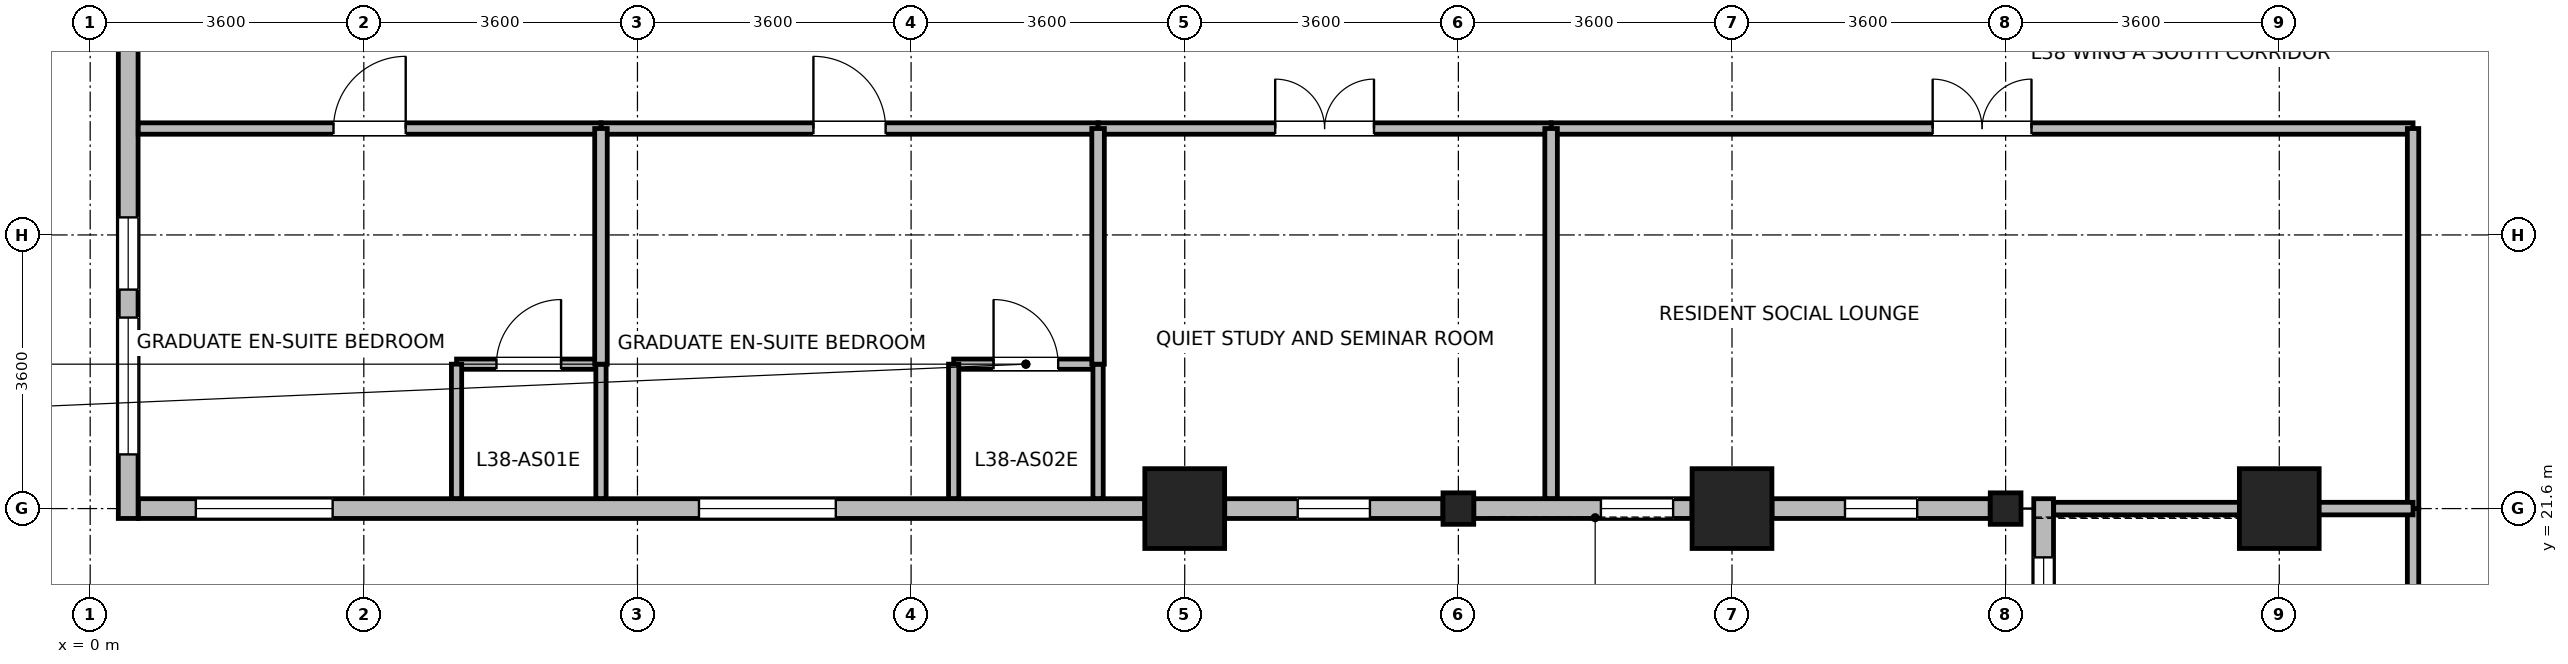
"""IFC4 building model, lengths in metres.
Left out: names, types, materials, properties, quantities, classifications, styles, units other than length and angle.
Written with IfcOpenShell. Run it as: python <this file> out.ifc"""

import sys

from ifc_helpers import new_model, si_unit, direction, frame, frame_2d, origin, origin_2d, place, context, subcontext, project, spatial, rectangle, i_section, extrude, source, transform, mapped, element, fill, save


model = new_model("IFC4")
c1 = context("Model", 3, precision=1e-05, world=origin(), true_north=direction((0.0, 1.0)))
c2 = subcontext(c1, "Body", "Model", "MODEL_VIEW")
j1 = project(units=[si_unit("LENGTHUNIT", "METRE"), si_unit("PLANEANGLEUNIT", "RADIAN")], contexts=[c1])
p1 = place(None, origin())
s1 = spatial("IfcSite", under=j1, at=p1, CompositionType="ELEMENT")
p2 = place(p1, origin())
s2 = spatial("IfcBuilding", under=s1, at=p2, CompositionType="ELEMENT")
p3 = place(p2, frame((0.0, 0.0, 151.3)))
s3 = spatial("IfcBuildingStorey", under=s2, at=p3, CompositionType="ELEMENT", Elevation=151.3)
m1 = source(origin(), c2, "Body", "SweptSolid", [
    extrude(rectangle(XDim=1.05, YDim=1.05, at=origin_2d()), origin(), (0.0, 0.0, 1.0), 3.7),
])
for number, where, z_axis, x_axis in (
    (1, (14.4, 21.6, 0.0), (0.0, 0.0, 1.0), (1.0, 0.0, 0.0)),
    (2, (21.6, 21.6, 0.0), (0.0, 0.0, 1.0), (1.0, 0.0, 0.0)),
    (3, (28.8, 21.6, 0.0), (0.0, 0.0, 1.0), (1.0, 0.0, 0.0)),
):
    element("IfcColumn", number, at=place(p3, frame(where, z_axis=z_axis, x_axis=x_axis)), inside=s3, PredefinedType="COLUMN", context=c2, shape_type="MappedRepresentation", body=[
        mapped(m1, transform((0.0, 0.0, 0.0), x_axis=(1.0, 0.0, 0.0), y_axis=(0.0, 1.0, 0.0), z_axis=(0.0, 0.0, 1.0), scale=1.0)),
    ])
m2 = source(origin(), c2, "Body", "SweptSolid", [
    extrude(i_section(OverallWidth=0.404, OverallDepth=0.414, WebThickness=0.021, FlangeThickness=0.028, FilletRadius=0.015, at=origin_2d()), origin(), (0.0, 0.0, 1.0), 3.7),
])
for number, where, z_axis, x_axis in (
    (4, (18.0, 21.6, 0.0), (0.0, 0.0, 1.0), (1.0, 0.0, 0.0)),
    (5, (25.2, 21.6, 0.0), (0.0, 0.0, 1.0), (1.0, 0.0, 0.0)),
):
    element("IfcColumn", number, at=place(p3, frame(where, z_axis=z_axis, x_axis=x_axis)), inside=s3, PredefinedType="COLUMN", context=c2, shape_type="MappedRepresentation", body=[
        mapped(m2, transform((0.0, 0.0, 0.0), x_axis=(1.0, 0.0, 0.0), y_axis=(0.0, 1.0, 0.0), z_axis=(0.0, 0.0, 1.0), scale=1.0)),
    ])
p4 = place(p3, frame((0.5, 21.47, 0.0), z_axis=(0.0, 0.0, 1.0), x_axis=(0.0, 1.0, 0.0)))
e6 = element("IfcWall", 6, at=p4, inside=s3, PredefinedType="STANDARD", context=c2, shape_type="SweptSolid", body=[
    extrude(rectangle(XDim=6.972, YDim=0.26, at=frame_2d((3.486, 0.0))), origin(), (0.0, 0.0, 1.0), 3.44),
])
p5 = place(p4, frame((0.843, 0.0, 0.85)))
e7 = element("IfcOpeningElement", 7, at=p5, cuts=e6, PredefinedType="OPENING", context=c2, shape_type="SweptSolid", body=[
    extrude(rectangle(XDim=1.8, YDim=1.85, at=frame_2d((0.9, 0.925))), frame((0.0, 0.14, 0.0), z_axis=(0.0, -1.0, 0.0), x_axis=(1.0, 0.0, 0.0)), (0.0, 0.0, 1.0), 0.28),
])
p6 = place(p4, frame((3.011, 0.0, 0.85)))
e8 = element("IfcOpeningElement", 8, at=p6, cuts=e6, PredefinedType="OPENING", context=c2, shape_type="SweptSolid", body=[
    extrude(rectangle(XDim=0.95, YDim=1.75, at=frame_2d((0.475, 0.875))), frame((0.0, 0.14, 0.0), z_axis=(0.0, -1.0, 0.0), x_axis=(1.0, 0.0, 0.0)), (0.0, 0.0, 1.0), 0.28),
])
p7 = place(p3, frame((13.874, 21.6, 0.0), z_axis=(0.0, 0.0, 1.0), x_axis=(-1.0, 0.0, 0.0)))
e9 = element("IfcWall", 9, at=p7, inside=s3, PredefinedType="STANDARD", context=c2, shape_type="SweptSolid", body=[
    extrude(rectangle(XDim=13.239, YDim=0.26, at=frame_2d((6.62, 0.0))), origin(), (0.0, 0.0, 1.0), 3.44),
])
p8 = place(p7, frame((4.065, 0.0, 0.85)))
e10 = element("IfcOpeningElement", 10, at=p8, cuts=e9, PredefinedType="OPENING", context=c2, shape_type="SweptSolid", body=[
    extrude(rectangle(XDim=1.8, YDim=1.85, at=frame_2d((0.9, 0.925))), frame((0.0, 0.14, 0.0), z_axis=(0.0, -1.0, 0.0), x_axis=(1.0, 0.0, 0.0)), (0.0, 0.0, 1.0), 0.28),
])
p9 = place(p7, frame((10.684, 0.0, 0.85)))
e11 = element("IfcOpeningElement", 11, at=p9, cuts=e9, PredefinedType="OPENING", context=c2, shape_type="SweptSolid", body=[
    extrude(rectangle(XDim=1.8, YDim=1.85, at=frame_2d((0.9, 0.925))), frame((0.0, 0.14, 0.0), z_axis=(0.0, -1.0, 0.0), x_axis=(1.0, 0.0, 0.0)), (0.0, 0.0, 1.0), 0.28),
])
p10 = place(p3, frame((17.797, 21.6, 0.0), z_axis=(0.0, 0.0, 1.0), x_axis=(-1.0, 0.0, 0.0)))
e12 = element("IfcWall", 12, at=p10, inside=s3, PredefinedType="STANDARD", context=c2, shape_type="SweptSolid", body=[
    extrude(rectangle(XDim=2.871, YDim=0.26, at=frame_2d((1.436, 0.0))), origin(), (0.0, 0.0, 1.0), 2.99),
])
p11 = place(p10, frame((0.96, 0.0, 0.85)))
e13 = element("IfcOpeningElement", 13, at=p11, cuts=e12, PredefinedType="OPENING", context=c2, shape_type="SweptSolid", body=[
    extrude(rectangle(XDim=0.95, YDim=1.75, at=frame_2d((0.475, 0.875))), frame((0.0, 0.14, 0.0), z_axis=(0.0, -1.0, 0.0), x_axis=(1.0, 0.0, 0.0)), (0.0, 0.0, 1.0), 0.28),
])
p12 = place(p3, frame((21.074, 21.6, 0.0), z_axis=(0.0, 0.0, 1.0), x_axis=(-1.0, 0.0, 0.0)))
e14 = element("IfcWall", 14, at=p12, inside=s3, PredefinedType="STANDARD", context=c2, shape_type="SweptSolid", body=[
    extrude(rectangle(XDim=2.871, YDim=0.26, at=frame_2d((1.436, 0.0))), origin(), (0.0, 0.0, 1.0), 2.99),
])
p13 = place(p12, frame((0.249, 0.0, 0.85)))
e15 = element("IfcOpeningElement", 15, at=p13, cuts=e14, PredefinedType="OPENING", context=c2, shape_type="SweptSolid", body=[
    extrude(rectangle(XDim=0.95, YDim=1.75, at=frame_2d((0.475, 0.875))), frame((0.0, 0.14, 0.0), z_axis=(0.0, -1.0, 0.0), x_axis=(1.0, 0.0, 0.0)), (0.0, 0.0, 1.0), 0.28),
])
p14 = place(p3, frame((24.997, 21.6, 0.0), z_axis=(0.0, 0.0, 1.0), x_axis=(-1.0, 0.0, 0.0)))
e16 = element("IfcWall", 16, at=p14, inside=s3, PredefinedType="STANDARD", context=c2, shape_type="SweptSolid", body=[
    extrude(rectangle(XDim=2.871, YDim=0.26, at=frame_2d((1.436, 0.0))), origin(), (0.0, 0.0, 1.0), 2.99),
])
p15 = place(p14, frame((0.96, 0.0, 0.85)))
e17 = element("IfcOpeningElement", 17, at=p15, cuts=e16, PredefinedType="OPENING", context=c2, shape_type="SweptSolid", body=[
    extrude(rectangle(XDim=0.95, YDim=1.75, at=frame_2d((0.475, 0.875))), frame((0.0, 0.14, 0.0), z_axis=(0.0, -1.0, 0.0), x_axis=(1.0, 0.0, 0.0)), (0.0, 0.0, 1.0), 0.28),
])
p16 = place(p3, frame((25.7, 1.67, 0.0), z_axis=(0.0, 0.0, 1.0), x_axis=(0.0, 1.0, 0.0)))
e18 = element("IfcWall", 18, at=p16, inside=s3, PredefinedType="STANDARD", context=c2, shape_type="SweptSolid", body=[
    extrude(rectangle(XDim=20.06, YDim=0.26, at=frame_2d((10.03, 0.0))), origin(), (0.0, 0.0, 1.0), 3.44),
])
p17 = place(p16, frame((0.772, 0.0, 0.85)))
e19 = element("IfcOpeningElement", 19, at=p17, cuts=e18, PredefinedType="OPENING", context=c2, shape_type="SweptSolid", body=[
    extrude(rectangle(XDim=1.8, YDim=1.85, at=frame_2d((0.9, 0.925))), frame((0.0, 0.14, 0.0), z_axis=(0.0, -1.0, 0.0), x_axis=(1.0, 0.0, 0.0)), (0.0, 0.0, 1.0), 0.28),
])
p18 = place(p16, frame((7.458, 0.0, 0.85)))
e20 = element("IfcOpeningElement", 20, at=p18, cuts=e18, PredefinedType="OPENING", context=c2, shape_type="SweptSolid", body=[
    extrude(rectangle(XDim=1.8, YDim=1.85, at=frame_2d((0.9, 0.925))), frame((0.0, 0.14, 0.0), z_axis=(0.0, -1.0, 0.0), x_axis=(1.0, 0.0, 0.0)), (0.0, 0.0, 1.0), 0.28),
])
p19 = place(p16, frame((14.145, 0.0, 0.85)))
e21 = element("IfcOpeningElement", 21, at=p19, cuts=e18, PredefinedType="OPENING", context=c2, shape_type="SweptSolid", body=[
    extrude(rectangle(XDim=1.8, YDim=1.85, at=frame_2d((0.9, 0.925))), frame((0.0, 0.14, 0.0), z_axis=(0.0, -1.0, 0.0), x_axis=(1.0, 0.0, 0.0)), (0.0, 0.0, 1.0), 0.28),
])
p20 = place(p16, frame((17.488, 0.0, 0.85)))
e22 = element("IfcOpeningElement", 22, at=p20, cuts=e18, PredefinedType="OPENING", context=c2, shape_type="SweptSolid", body=[
    extrude(rectangle(XDim=1.8, YDim=1.85, at=frame_2d((0.9, 0.925))), frame((0.0, 0.14, 0.0), z_axis=(0.0, -1.0, 0.0), x_axis=(1.0, 0.0, 0.0)), (0.0, 0.0, 1.0), 0.28),
])
p21 = place(p3, frame((11.36, 23.5, 0.0), z_axis=(0.0, 0.0, 1.0), x_axis=(1.0, 0.0, 0.0)))
e23 = element("IfcWall", 23, at=p21, inside=s3, PredefinedType="PARTITIONING", context=c2, shape_type="SweptSolid", body=[
    extrude(rectangle(XDim=1.9, YDim=0.135, at=frame_2d((0.95, 0.0))), origin(), (0.0, 0.0, 1.0), 3.44),
])
p22 = place(p21, frame((0.525, 0.0, 0.0)))
e24 = element("IfcOpeningElement", 24, at=p22, cuts=e23, PredefinedType="OPENING", context=c2, shape_type="SweptSolid", body=[
    extrude(rectangle(XDim=0.85, YDim=2.04, at=frame_2d((0.425, 1.02))), frame((0.0, 0.078, 0.0), z_axis=(0.0, -1.0, 0.0), x_axis=(1.0, 0.0, 0.0)), (0.0, 0.0, 1.0), 0.155),
])
p23 = place(p3, frame((4.82, 23.5, 0.0), z_axis=(0.0, 0.0, 1.0), x_axis=(1.0, 0.0, 0.0)))
e25 = element("IfcWall", 25, at=p23, inside=s3, PredefinedType="PARTITIONING", context=c2, shape_type="SweptSolid", body=[
    extrude(rectangle(XDim=1.9, YDim=0.135, at=frame_2d((0.95, 0.0))), origin(), (0.0, 0.0, 1.0), 3.44),
])
p24 = place(p23, frame((0.525, 0.0, 0.0)))
e26 = element("IfcOpeningElement", 26, at=p24, cuts=e25, PredefinedType="OPENING", context=c2, shape_type="SweptSolid", body=[
    extrude(rectangle(XDim=0.85, YDim=2.04, at=frame_2d((0.425, 1.02))), frame((0.0, 0.078, 0.0), z_axis=(0.0, -1.0, 0.0), x_axis=(1.0, 0.0, 0.0)), (0.0, 0.0, 1.0), 0.155),
])
for number, where, z_axis, x_axis in (
    (27, (4.82, 21.732, 0.0), (0.0, 0.0, 1.0), (0.0, 1.0, 0.0)),
    (28, (6.72, 21.732, 0.0), (0.0, 0.0, 1.0), (0.0, 1.0, 0.0)),
    (29, (11.36, 21.732, 0.0), (0.0, 0.0, 1.0), (0.0, 1.0, 0.0)),
    (30, (13.26, 21.732, 0.0), (0.0, 0.0, 1.0), (0.0, 1.0, 0.0)),
):
    element("IfcWall", number, at=place(p3, frame(where, z_axis=z_axis, x_axis=x_axis)), inside=s3, PredefinedType="PARTITIONING", context=c2, shape_type="SweptSolid", body=[
        extrude(rectangle(XDim=1.768, YDim=0.135, at=frame_2d((0.884, 0.0))), origin(), (0.0, 0.0, 1.0), 3.44),
    ])
p25 = place(p3, frame((19.22, 26.6, 0.0), z_axis=(0.0, 0.0, 1.0), x_axis=(1.0, 0.0, 0.0)))
e31 = element("IfcWall", 31, at=p25, inside=s3, PredefinedType="PARTITIONING", context=c2, shape_type="SweptSolid", body=[
    extrude(rectangle(XDim=11.34, YDim=0.15, at=frame_2d((5.67, 0.0))), origin(), (0.0, 0.0, 1.0), 3.44),
])
p26 = place(p25, frame((5.02, 0.0, 0.0)))
e32 = element("IfcOpeningElement", 32, at=p26, cuts=e31, PredefinedType="OPENING", context=c2, shape_type="SweptSolid", body=[
    extrude(rectangle(XDim=1.3, YDim=2.12, at=frame_2d((0.65, 1.06))), frame((0.0, 0.085, 0.0), z_axis=(0.0, -1.0, 0.0), x_axis=(1.0, 0.0, 0.0)), (0.0, 0.0, 1.0), 0.17),
])
p27 = place(p3, frame((30.56, 14.5, 0.0), z_axis=(0.0, 0.0, 1.0), x_axis=(0.0, 1.0, 0.0)))
e33 = element("IfcWall", 33, at=p27, inside=s3, PredefinedType="PARTITIONING", context=c2, shape_type="SweptSolid", body=[
    extrude(rectangle(XDim=7.1, YDim=0.15, at=frame_2d((3.55, 0.0))), origin(), (0.0, 0.0, 1.0), 3.44),
])
p28 = place(p27, frame((2.9, 0.0, 0.0)))
e34 = element("IfcOpeningElement", 34, at=p28, cuts=e33, PredefinedType="OPENING", context=c2, shape_type="SweptSolid", body=[
    extrude(rectangle(XDim=1.3, YDim=2.12, at=frame_2d((0.65, 1.06))), frame((0.0, 0.085, 0.0), z_axis=(0.0, -1.0, 0.0), x_axis=(1.0, 0.0, 0.0)), (0.0, 0.0, 1.0), 0.17),
])
p29 = place(p3, frame((6.72, 26.6, 0.0), z_axis=(0.0, 0.0, 1.0), x_axis=(1.0, 0.0, 0.0)))
e35 = element("IfcWall", 35, at=p29, inside=s3, PredefinedType="PARTITIONING", context=c2, shape_type="SweptSolid", body=[
    extrude(rectangle(XDim=6.54, YDim=0.15, at=frame_2d((3.27, 0.0))), origin(), (0.0, 0.0, 1.0), 3.44),
])
p30 = place(p29, frame((2.795, 0.0, 0.0)))
e36 = element("IfcOpeningElement", 36, at=p30, cuts=e35, PredefinedType="OPENING", context=c2, shape_type="SweptSolid", body=[
    extrude(rectangle(XDim=0.95, YDim=2.1, at=frame_2d((0.475, 1.05))), frame((0.0, 0.085, 0.0), z_axis=(0.0, -1.0, 0.0), x_axis=(1.0, 0.0, 0.0)), (0.0, 0.0, 1.0), 0.17),
])
p31 = place(p3, frame((0.632, 26.6, 0.0), z_axis=(0.0, 0.0, 1.0), x_axis=(1.0, 0.0, 0.0)))
e37 = element("IfcWall", 37, at=p31, inside=s3, PredefinedType="PARTITIONING", context=c2, shape_type="SweptSolid", body=[
    extrude(rectangle(XDim=6.088, YDim=0.15, at=frame_2d((3.044, 0.0))), origin(), (0.0, 0.0, 1.0), 3.44),
])
p32 = place(p31, frame((2.569, 0.0, 0.0)))
e38 = element("IfcOpeningElement", 38, at=p32, cuts=e37, PredefinedType="OPENING", context=c2, shape_type="SweptSolid", body=[
    extrude(rectangle(XDim=0.95, YDim=2.1, at=frame_2d((0.475, 1.05))), frame((0.0, 0.085, 0.0), z_axis=(0.0, -1.0, 0.0), x_axis=(1.0, 0.0, 0.0)), (0.0, 0.0, 1.0), 0.17),
])
p33 = place(p3, frame((13.26, 26.6, 0.0), z_axis=(0.0, 0.0, 1.0), x_axis=(1.0, 0.0, 0.0)))
e39 = element("IfcWall", 39, at=p33, inside=s3, PredefinedType="PARTITIONING", context=c2, shape_type="SweptSolid", body=[
    extrude(rectangle(XDim=5.96, YDim=0.15, at=frame_2d((2.98, 0.0))), origin(), (0.0, 0.0, 1.0), 3.44),
])
p34 = place(p33, frame((2.33, 0.0, 0.0)))
e40 = element("IfcOpeningElement", 40, at=p34, cuts=e39, PredefinedType="OPENING", context=c2, shape_type="SweptSolid", body=[
    extrude(rectangle(XDim=1.3, YDim=2.12, at=frame_2d((0.65, 1.06))), frame((0.0, 0.085, 0.0), z_axis=(0.0, -1.0, 0.0), x_axis=(1.0, 0.0, 0.0)), (0.0, 0.0, 1.0), 0.17),
])
p35 = place(p3, frame((30.56, 21.6, 0.0), z_axis=(0.0, 0.0, 1.0), x_axis=(0.0, 1.0, 0.0)))
e41 = element("IfcWall", 41, at=p35, inside=s3, PredefinedType="PARTITIONING", context=c2, shape_type="SweptSolid", body=[
    extrude(rectangle(XDim=5.0, YDim=0.15, at=frame_2d((2.5, 0.0))), origin(), (0.0, 0.0, 1.0), 3.44),
])
p36 = place(p3, frame((19.22, 21.732, 0.0), z_axis=(0.0, 0.0, 1.0), x_axis=(0.0, 1.0, 0.0)))
e42 = element("IfcWall", 42, at=p36, inside=s3, PredefinedType="PARTITIONING", context=c2, shape_type="SweptSolid", body=[
    extrude(rectangle(XDim=4.868, YDim=0.165, at=frame_2d((2.434, 0.0))), origin(), (0.0, 0.0, 1.0), 3.44),
])
p37 = place(p3, frame((25.832, 21.6, 0.0), z_axis=(0.0, 0.0, 1.0), x_axis=(1.0, 0.0, 0.0)))
e43 = element("IfcWall", 43, at=p37, inside=s3, PredefinedType="PARTITIONING", context=c2, shape_type="SweptSolid", body=[
    extrude(rectangle(XDim=4.728, YDim=0.165, at=frame_2d((2.364, 0.0))), origin(), (0.0, 0.0, 1.0), 2.99),
])
for number, where, z_axis, x_axis in (
    (44, (6.72, 23.5, 0.0), (0.0, 0.0, 1.0), (0.0, 1.0, 0.0)),
    (45, (13.26, 23.5, 0.0), (0.0, 0.0, 1.0), (0.0, 1.0, 0.0)),
):
    element("IfcWall", number, at=place(p3, frame(where, z_axis=z_axis, x_axis=x_axis)), inside=s3, PredefinedType="PARTITIONING", context=c2, shape_type="SweptSolid", body=[
        extrude(rectangle(XDim=3.1, YDim=0.165, at=frame_2d((1.55, 0.0))), origin(), (0.0, 0.0, 1.0), 3.44),
    ])
p38 = place(p5, origin())
e46 = element("IfcWindow", 46, at=p38, inside=s3, PartitioningType="SINGLE_PANEL", PredefinedType="WINDOW", context=c2, shape_type="SweptSolid", body=[
    extrude(rectangle(XDim=1.8, YDim=1.85, at=frame_2d((0.9, 0.925))), frame((0.0, 0.03, 0.0), z_axis=(0.0, -1.0, 0.0), x_axis=(1.0, 0.0, 0.0)), (0.0, 0.0, 1.0), 0.06),
])
fill(e7, e46)
p39 = place(p6, origin())
e47 = element("IfcWindow", 47, at=p39, inside=s3, PartitioningType="SINGLE_PANEL", PredefinedType="WINDOW", context=c2, shape_type="SweptSolid", body=[
    extrude(rectangle(XDim=0.95, YDim=1.75, at=frame_2d((0.475, 0.875))), frame((0.0, 0.03, 0.0), z_axis=(0.0, -1.0, 0.0), x_axis=(1.0, 0.0, 0.0)), (0.0, 0.0, 1.0), 0.06),
])
fill(e8, e47)
p40 = place(p8, origin())
e48 = element("IfcWindow", 48, at=p40, inside=s3, PartitioningType="SINGLE_PANEL", PredefinedType="WINDOW", context=c2, shape_type="SweptSolid", body=[
    extrude(rectangle(XDim=1.8, YDim=1.85, at=frame_2d((0.9, 0.925))), frame((0.0, 0.03, 0.0), z_axis=(0.0, -1.0, 0.0), x_axis=(1.0, 0.0, 0.0)), (0.0, 0.0, 1.0), 0.06),
])
fill(e10, e48)
p41 = place(p9, origin())
e49 = element("IfcWindow", 49, at=p41, inside=s3, PartitioningType="SINGLE_PANEL", PredefinedType="WINDOW", context=c2, shape_type="SweptSolid", body=[
    extrude(rectangle(XDim=1.8, YDim=1.85, at=frame_2d((0.9, 0.925))), frame((0.0, 0.03, 0.0), z_axis=(0.0, -1.0, 0.0), x_axis=(1.0, 0.0, 0.0)), (0.0, 0.0, 1.0), 0.06),
])
fill(e11, e49)
p42 = place(p11, origin())
e50 = element("IfcWindow", 50, at=p42, inside=s3, PartitioningType="SINGLE_PANEL", PredefinedType="WINDOW", context=c2, shape_type="SweptSolid", body=[
    extrude(rectangle(XDim=0.95, YDim=1.75, at=frame_2d((0.475, 0.875))), frame((0.0, 0.03, 0.0), z_axis=(0.0, -1.0, 0.0), x_axis=(1.0, 0.0, 0.0)), (0.0, 0.0, 1.0), 0.06),
])
fill(e13, e50)
p43 = place(p13, origin())
e51 = element("IfcWindow", 51, at=p43, inside=s3, PartitioningType="SINGLE_PANEL", PredefinedType="WINDOW", context=c2, shape_type="SweptSolid", body=[
    extrude(rectangle(XDim=0.95, YDim=1.75, at=frame_2d((0.475, 0.875))), frame((0.0, 0.03, 0.0), z_axis=(0.0, -1.0, 0.0), x_axis=(1.0, 0.0, 0.0)), (0.0, 0.0, 1.0), 0.06),
])
fill(e15, e51)
p44 = place(p15, origin())
e52 = element("IfcWindow", 52, at=p44, inside=s3, PartitioningType="SINGLE_PANEL", PredefinedType="WINDOW", context=c2, shape_type="SweptSolid", body=[
    extrude(rectangle(XDim=0.95, YDim=1.75, at=frame_2d((0.475, 0.875))), frame((0.0, 0.03, 0.0), z_axis=(0.0, -1.0, 0.0), x_axis=(1.0, 0.0, 0.0)), (0.0, 0.0, 1.0), 0.06),
])
fill(e17, e52)
p45 = place(p20, origin())
e53 = element("IfcWindow", 53, at=p45, inside=s3, PartitioningType="SINGLE_PANEL", PredefinedType="WINDOW", context=c2, shape_type="SweptSolid", body=[
    extrude(rectangle(XDim=1.8, YDim=1.85, at=frame_2d((0.9, 0.925))), frame((0.0, 0.03, 0.0), z_axis=(0.0, -1.0, 0.0), x_axis=(1.0, 0.0, 0.0)), (0.0, 0.0, 1.0), 0.06),
])
fill(e22, e53)
p46 = place(p22, origin())
e54 = element("IfcDoor", 54, at=p46, inside=s3, OperationType="SINGLE_SWING_LEFT", PredefinedType="DOOR", context=c2, shape_type="SweptSolid", body=[
    extrude(rectangle(XDim=0.85, YDim=2.04, at=frame_2d((0.425, 1.02))), frame((0.0, 0.025, 0.0), z_axis=(0.0, -1.0, 0.0), x_axis=(1.0, 0.0, 0.0)), (0.0, 0.0, 1.0), 0.05),
])
fill(e24, e54)
p47 = place(p24, origin())
e55 = element("IfcDoor", 55, at=p47, inside=s3, OperationType="SINGLE_SWING_RIGHT", PredefinedType="DOOR", context=c2, shape_type="SweptSolid", body=[
    extrude(rectangle(XDim=0.85, YDim=2.04, at=frame_2d((0.425, 1.02))), frame((0.0, 0.025, 0.0), z_axis=(0.0, -1.0, 0.0), x_axis=(1.0, 0.0, 0.0)), (0.0, 0.0, 1.0), 0.05),
])
fill(e26, e55)
p48 = place(p26, origin())
e56 = element("IfcDoor", 56, at=p48, inside=s3, OperationType="DOUBLE_DOOR_SINGLE_SWING", PredefinedType="DOOR", context=c2, shape_type="SweptSolid", body=[
    extrude(rectangle(XDim=1.3, YDim=2.12, at=frame_2d((0.65, 1.06))), frame((0.0, 0.025, 0.0), z_axis=(0.0, -1.0, 0.0), x_axis=(1.0, 0.0, 0.0)), (0.0, 0.0, 1.0), 0.05),
])
fill(e32, e56)
p49 = place(p30, origin())
e57 = element("IfcDoor", 57, at=p49, inside=s3, OperationType="SINGLE_SWING_LEFT", PredefinedType="DOOR", context=c2, shape_type="SweptSolid", body=[
    extrude(rectangle(XDim=0.95, YDim=2.1, at=frame_2d((0.475, 1.05))), frame((0.0, 0.025, 0.0), z_axis=(0.0, -1.0, 0.0), x_axis=(1.0, 0.0, 0.0)), (0.0, 0.0, 1.0), 0.05),
])
fill(e36, e57)
p50 = place(p32, origin())
e58 = element("IfcDoor", 58, at=p50, inside=s3, OperationType="SINGLE_SWING_RIGHT", PredefinedType="DOOR", context=c2, shape_type="SweptSolid", body=[
    extrude(rectangle(XDim=0.95, YDim=2.1, at=frame_2d((0.475, 1.05))), frame((0.0, 0.025, 0.0), z_axis=(0.0, -1.0, 0.0), x_axis=(1.0, 0.0, 0.0)), (0.0, 0.0, 1.0), 0.05),
])
fill(e38, e58)
p51 = place(p34, origin())
e59 = element("IfcDoor", 59, at=p51, inside=s3, OperationType="DOUBLE_DOOR_SINGLE_SWING", PredefinedType="DOOR", context=c2, shape_type="SweptSolid", body=[
    extrude(rectangle(XDim=1.3, YDim=2.12, at=frame_2d((0.65, 1.06))), frame((0.0, 0.025, 0.0), z_axis=(0.0, -1.0, 0.0), x_axis=(1.0, 0.0, 0.0)), (0.0, 0.0, 1.0), 0.05),
])
fill(e40, e59)
save(model, sys.argv[1])
